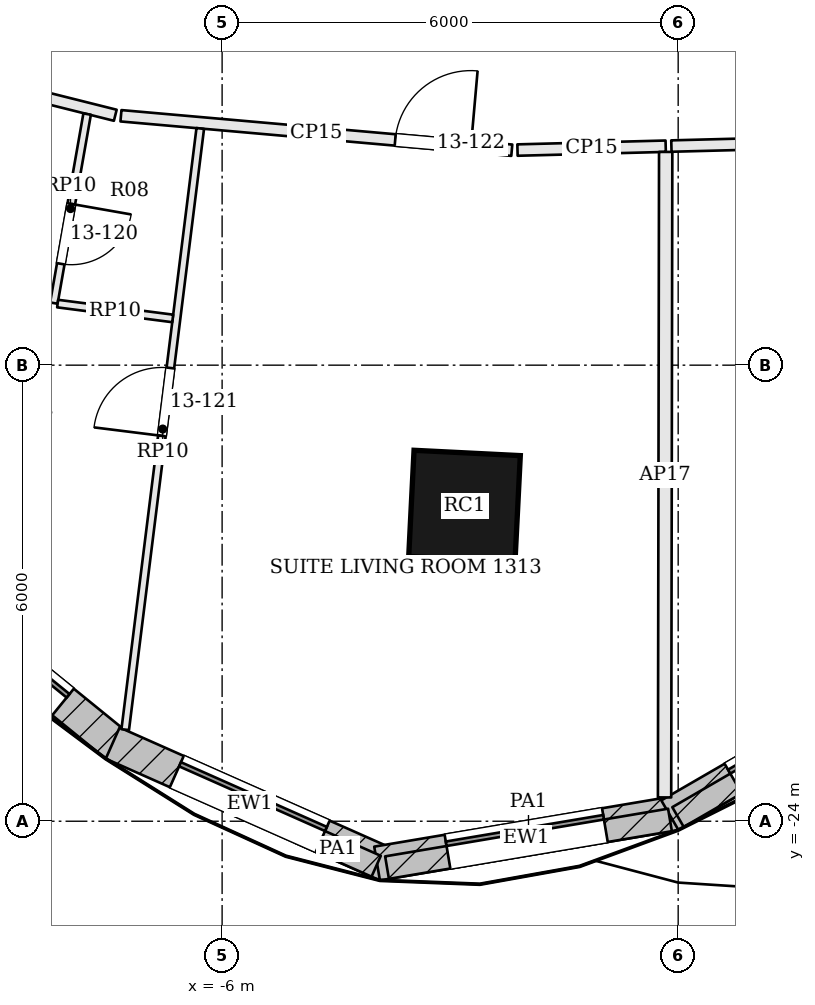
"""IFC4 building model, lengths in metres.
Left out: names, types, materials, properties, quantities, classifications, styles, units other than length and angle.
Written with IfcOpenShell. Run it as: python <this file> out.ifc"""

import sys

from ifc_helpers import new_model, si_unit, direction, frame, frame_2d, origin, origin_2d, place, context, subcontext, project, spatial, rectangle, extrude, element, fill, save


model = new_model("IFC4")
c1 = context("Model", 3, precision=1e-05, world=origin(), true_north=direction((0.0, 1.0)))
c2 = subcontext(c1, "Body", "Model", "MODEL_VIEW")
j1 = project(units=[si_unit("LENGTHUNIT", "METRE"), si_unit("PLANEANGLEUNIT", "RADIAN")], contexts=[c1])
p1 = place(None, origin())
s1 = spatial("IfcSite", under=j1, at=p1, CompositionType="ELEMENT")
p2 = place(p1, origin())
s2 = spatial("IfcBuilding", under=s1, at=p2, CompositionType="ELEMENT")
p3 = place(p2, frame((0.0, 0.0, 62.7)))
s3 = spatial("IfcBuildingStorey", under=s2, at=p3, CompositionType="ELEMENT", Elevation=62.7)
p4 = place(p3, frame((-2.811, -19.854, 0.0), z_axis=(0.0, 0.0, 1.0), x_axis=(0.99874501614, -0.050083857035, 0.0)))
e1 = element("IfcColumn", 1, at=p4, inside=s3, PredefinedType="COLUMN", context=c2, shape_type="SweptSolid", body=[
    extrude(rectangle(XDim=1.4, YDim=1.4, at=origin_2d()), origin(), (0.0, 0.0, 1.0), 3.6),
])
p5 = place(p3, frame((-10.422, -20.539, 0.0), z_axis=(0.0, 0.0, 1.0), x_axis=(0.775999170522, -0.63073392754, 0.0)))
e2 = element("IfcWall", 2, at=p5, inside=s3, PredefinedType="SOLIDWALL", context=c2, shape_type="SweptSolid", body=[
    extrude(rectangle(XDim=3.903, YDim=0.45, at=frame_2d((1.951, 0.0))), origin(), (0.0, 0.0, 1.0), 3.4),
])
p6 = place(p5, frame((0.901, 0.0, 0.9)))
e3 = element("IfcOpeningElement", 3, at=p6, cuts=e2, PredefinedType="OPENING", context=c2, shape_type="SweptSolid", body=[
    extrude(rectangle(XDim=2.1, YDim=2.0, at=frame_2d((1.05, 1.0))), frame((0.0, 0.235, 0.0), z_axis=(0.0, -1.0, 0.0), x_axis=(1.0, 0.0, 0.0)), (0.0, 0.0, 1.0), 0.47),
])
p7 = place(p3, frame((-7.44, -22.972, 0.0), z_axis=(0.0, 0.0, 1.0), x_axis=(0.914114918534, -0.405455195692, 0.0)))
e4 = element("IfcWall", 4, at=p7, inside=s3, PredefinedType="SOLIDWALL", context=c2, shape_type="SweptSolid", body=[
    extrude(rectangle(XDim=3.946, YDim=0.45, at=frame_2d((1.973, 0.0))), origin(), (0.0, 0.0, 1.0), 3.4),
])
p8 = place(p7, frame((0.923, 0.0, 0.9)))
e5 = element("IfcOpeningElement", 5, at=p8, cuts=e4, PredefinedType="OPENING", context=c2, shape_type="SweptSolid", body=[
    extrude(rectangle(XDim=2.1, YDim=2.0, at=frame_2d((1.05, 1.0))), frame((0.0, 0.235, 0.0), z_axis=(0.0, -1.0, 0.0), x_axis=(1.0, 0.0, 0.0)), (0.0, 0.0, 1.0), 0.47),
])
p9 = place(p3, frame((-3.961, -24.556, 0.0), z_axis=(0.0, 0.0, 1.0), x_axis=(0.986102211406, 0.166139786505, 0.0)))
e6 = element("IfcWall", 6, at=p9, inside=s3, PredefinedType="SOLIDWALL", context=c2, shape_type="SweptSolid", body=[
    extrude(rectangle(XDim=3.979, YDim=0.45, at=frame_2d((1.99, 0.0))), origin(), (0.0, 0.0, 1.0), 3.4),
])
p10 = place(p9, frame((0.94, 0.0, 0.9)))
e7 = element("IfcOpeningElement", 7, at=p10, cuts=e6, PredefinedType="OPENING", context=c2, shape_type="SweptSolid", body=[
    extrude(rectangle(XDim=2.1, YDim=2.0, at=frame_2d((1.05, 1.0))), frame((0.0, 0.235, 0.0), z_axis=(0.0, -1.0, 0.0), x_axis=(1.0, 0.0, 0.0)), (0.0, 0.0, 1.0), 0.47),
])
p11 = place(p3, frame((-0.109, -23.92, 0.0), z_axis=(0.0, 0.0, 1.0), x_axis=(0.865557769603, 0.500809092848, 0.0)))
e8 = element("IfcWall", 8, at=p11, inside=s3, PredefinedType="SOLIDWALL", context=c2, shape_type="SweptSolid", body=[
    extrude(rectangle(XDim=4.025, YDim=0.45, at=frame_2d((2.012, 0.0))), origin(), (0.0, 0.0, 1.0), 3.4),
])
p12 = place(p11, frame((0.962, 0.0, 0.9)))
e9 = element("IfcOpeningElement", 9, at=p12, cuts=e8, PredefinedType="OPENING", context=c2, shape_type="SweptSolid", body=[
    extrude(rectangle(XDim=2.1, YDim=2.0, at=frame_2d((1.05, 1.0))), frame((0.0, 0.235, 0.0), z_axis=(0.0, -1.0, 0.0), x_axis=(1.0, 0.0, 0.0)), (0.0, 0.0, 1.0), 0.47),
])
p13 = place(p3, frame((-4.979, -24.146, 3.6), z_axis=(0.0, 0.0, 1.0), x_axis=(0.91414047558, -0.405397571412, 0.0)))
e10 = element("IfcWall", 10, at=p13, inside=s3, PredefinedType="PARAPET", context=c2, shape_type="SweptSolid", body=[
    extrude(rectangle(XDim=1.101, YDim=0.3, at=frame_2d((0.55, 0.0))), origin(), (0.0, 0.0, 1.0), 1.1),
])
p14 = place(p3, frame((-3.83, -24.61, 3.6), z_axis=(0.0, 0.0, 1.0), x_axis=(0.986111051666, 0.166087307712, 0.0)))
e11 = element("IfcWall", 11, at=p14, inside=s3, PredefinedType="PARAPET", context=c2, shape_type="SweptSolid", body=[
    extrude(rectangle(XDim=3.775, YDim=0.3, at=frame_2d((1.887, 0.0))), origin(), (0.0, 0.0, 1.0), 1.1),
])
p15 = place(p3, frame((-0.002, -23.945, 3.6), z_axis=(0.0, 0.0, 1.0), x_axis=(0.865550152763, 0.500822256945, 0.0)))
e12 = element("IfcWall", 12, at=p15, inside=s3, PredefinedType="PARAPET", context=c2, shape_type="SweptSolid", body=[
    extrude(rectangle(XDim=3.913, YDim=0.3, at=frame_2d((1.956, 0.0))), origin(), (0.0, 0.0, 1.0), 1.1),
])
p16 = place(p3, frame((-12.083, -13.54, 0.0), z_axis=(0.0, 0.0, 1.0), x_axis=(0.969981460173, -0.243178878443, 0.0)))
e13 = element("IfcWall", 13, at=p16, inside=s3, PredefinedType="PARTITIONING", context=c2, shape_type="SweptSolid", body=[
    extrude(rectangle(XDim=4.822, YDim=0.15, at=frame_2d((2.411, 0.0))), origin(), (0.0, 0.0, 1.0), 2.68),
])
p17 = place(p3, frame((-7.331, -14.719, 0.0), z_axis=(0.0, 0.0, 1.0), x_axis=(0.996139466017, -0.087784760882, 0.0)))
e14 = element("IfcWall", 14, at=p17, inside=s3, PredefinedType="PARTITIONING", context=c2, shape_type="SweptSolid", body=[
    extrude(rectangle(XDim=5.162, YDim=0.15, at=frame_2d((2.581, 0.0))), origin(), (0.0, 0.0, 1.0), 2.68),
])
p18 = place(p17, frame((3.622, 0.0, 0.0)))
e15 = element("IfcOpeningElement", 15, at=p18, cuts=e14, PredefinedType="OPENING", context=c2, shape_type="SweptSolid", body=[
    extrude(rectangle(XDim=1.0, YDim=2.1, at=frame_2d((0.5, 1.05))), frame((0.0, 0.085, 0.0), z_axis=(0.0, -1.0, 0.0), x_axis=(1.0, 0.0, 0.0)), (0.0, 0.0, 1.0), 0.17),
])
p19 = place(p3, frame((-2.114, -15.17, 0.0), z_axis=(0.0, 0.0, 1.0), x_axis=(0.999660986361, 0.026036749958, 0.0)))
e16 = element("IfcWall", 16, at=p19, inside=s3, PredefinedType="PARTITIONING", context=c2, shape_type="SweptSolid", body=[
    extrude(rectangle(XDim=1.95, YDim=0.15, at=frame_2d((0.975, 0.0))), origin(), (0.0, 0.0, 1.0), 2.68),
])
p20 = place(p3, frame((-0.179, -23.687, 0.0), z_axis=(0.0, 0.0, 1.0), x_axis=(0.001753677156, 0.999998462307, 0.0)))
e17 = element("IfcWall", 17, at=p20, inside=s3, PredefinedType="PARTITIONING", context=c2, shape_type="SweptSolid", body=[
    extrude(rectangle(XDim=8.492, YDim=0.175, at=frame_2d((4.246, 0.0))), origin(), (0.0, 0.0, 1.0), 2.68),
])
p21 = place(p3, frame((-0.089, -15.117, 0.0), z_axis=(0.0, 0.0, 1.0), x_axis=(0.999662208654, 0.025989778545, 0.0)))
e18 = element("IfcWall", 18, at=p21, inside=s3, PredefinedType="PARTITIONING", context=c2, shape_type="SweptSolid", body=[
    extrude(rectangle(XDim=5.43, YDim=0.15, at=frame_2d((2.715, 0.0))), origin(), (0.0, 0.0, 1.0), 2.68),
])
p22 = place(p3, frame((-7.275, -22.795, 0.0), z_axis=(0.0, 0.0, 1.0), x_axis=(0.123872623133, 0.992298127197, 0.0)))
e19 = element("IfcWall", 19, at=p22, inside=s3, PredefinedType="PARTITIONING", context=c2, shape_type="SweptSolid", body=[
    extrude(rectangle(XDim=7.97, YDim=0.1, at=frame_2d((3.985, 0.0))), origin(), (0.0, 0.0, 1.0), 2.68),
])
p23 = place(p22, frame((3.895, 0.0, 0.0)))
e20 = element("IfcOpeningElement", 20, at=p23, cuts=e19, PredefinedType="OPENING", context=c2, shape_type="SweptSolid", body=[
    extrude(rectangle(XDim=0.9, YDim=2.4, at=frame_2d((0.45, 1.2))), frame((0.0, 0.06, 0.0), z_axis=(0.0, -1.0, 0.0), x_axis=(1.0, 0.0, 0.0)), (0.0, 0.0, 1.0), 0.12),
])
p24 = place(p3, frame((-7.776, -14.697, 0.0), z_axis=(0.0, 0.0, 1.0), x_axis=(-0.173360606745, -0.984858416235, 0.0)))
e21 = element("IfcWall", 21, at=p24, inside=s3, PredefinedType="PARTITIONING", context=c2, shape_type="SweptSolid", body=[
    extrude(rectangle(XDim=2.525, YDim=0.1, at=frame_2d((1.263, 0.0))), origin(), (0.0, 0.0, 1.0), 2.68),
])
p25 = place(p24, frame((1.2, 0.0, 0.0)))
e22 = element("IfcOpeningElement", 22, at=p25, cuts=e21, PredefinedType="OPENING", context=c2, shape_type="SweptSolid", body=[
    extrude(rectangle(XDim=0.8, YDim=2.1, at=frame_2d((0.4, 1.05))), frame((0.0, 0.06, 0.0), z_axis=(0.0, -1.0, 0.0), x_axis=(1.0, 0.0, 0.0)), (0.0, 0.0, 1.0), 0.12),
])
p26 = place(p3, frame((-8.164, -17.19, 0.0), z_axis=(0.0, 0.0, 1.0), x_axis=(0.991762801698, -0.128088036788, 0.0)))
e23 = element("IfcWall", 23, at=p26, inside=s3, PredefinedType="PARTITIONING", context=c2, shape_type="SweptSolid", body=[
    extrude(rectangle(XDim=1.527, YDim=0.1, at=frame_2d((0.763, 0.0))), origin(), (0.0, 0.0, 1.0), 2.68),
])
p27 = place(p6, origin())
e24 = element("IfcWindow", 24, at=p27, inside=s3, PartitioningType="SINGLE_PANEL", PredefinedType="WINDOW", context=c2, shape_type="SweptSolid", body=[
    extrude(rectangle(XDim=2.1, YDim=2.0, at=frame_2d((1.05, 1.0))), frame((0.0, 0.135, 0.0), z_axis=(0.0, -1.0, 0.0), x_axis=(1.0, 0.0, 0.0)), (0.0, 0.0, 1.0), 0.06),
])
fill(e3, e24)
p28 = place(p8, origin())
e25 = element("IfcWindow", 25, at=p28, inside=s3, PartitioningType="SINGLE_PANEL", PredefinedType="WINDOW", context=c2, shape_type="SweptSolid", body=[
    extrude(rectangle(XDim=2.1, YDim=2.0, at=frame_2d((1.05, 1.0))), frame((0.0, 0.135, 0.0), z_axis=(0.0, -1.0, 0.0), x_axis=(1.0, 0.0, 0.0)), (0.0, 0.0, 1.0), 0.06),
])
fill(e5, e25)
p29 = place(p10, origin())
e26 = element("IfcWindow", 26, at=p29, inside=s3, PartitioningType="SINGLE_PANEL", PredefinedType="WINDOW", context=c2, shape_type="SweptSolid", body=[
    extrude(rectangle(XDim=2.1, YDim=2.0, at=frame_2d((1.05, 1.0))), frame((0.0, 0.135, 0.0), z_axis=(0.0, -1.0, 0.0), x_axis=(1.0, 0.0, 0.0)), (0.0, 0.0, 1.0), 0.06),
])
fill(e7, e26)
p30 = place(p12, origin())
e27 = element("IfcWindow", 27, at=p30, inside=s3, PartitioningType="SINGLE_PANEL", PredefinedType="WINDOW", context=c2, shape_type="SweptSolid", body=[
    extrude(rectangle(XDim=2.1, YDim=2.0, at=frame_2d((1.05, 1.0))), frame((0.0, 0.135, 0.0), z_axis=(0.0, -1.0, 0.0), x_axis=(1.0, 0.0, 0.0)), (0.0, 0.0, 1.0), 0.06),
])
fill(e9, e27)
p31 = place(p25, origin())
e28 = element("IfcDoor", 28, at=p31, inside=s3, OperationType="SINGLE_SWING_LEFT", PredefinedType="DOOR", context=c2, shape_type="SweptSolid", body=[
    extrude(rectangle(XDim=0.8, YDim=2.1, at=frame_2d((0.4, 1.05))), frame((0.0, 0.025, 0.0), z_axis=(0.0, -1.0, 0.0), x_axis=(1.0, 0.0, 0.0)), (0.0, 0.0, 1.0), 0.05),
])
fill(e22, e28)
p32 = place(p23, origin())
e29 = element("IfcDoor", 29, at=p32, inside=s3, OperationType="SINGLE_SWING_LEFT", PredefinedType="DOOR", context=c2, shape_type="SweptSolid", body=[
    extrude(rectangle(XDim=0.9, YDim=2.4, at=frame_2d((0.45, 1.2))), frame((0.0, 0.025, 0.0), z_axis=(0.0, -1.0, 0.0), x_axis=(1.0, 0.0, 0.0)), (0.0, 0.0, 1.0), 0.05),
])
fill(e20, e29)
p33 = place(p18, origin())
e30 = element("IfcDoor", 30, at=p33, inside=s3, OperationType="SINGLE_SWING_RIGHT", PredefinedType="DOOR", context=c2, shape_type="SweptSolid", body=[
    extrude(rectangle(XDim=1.0, YDim=2.1, at=frame_2d((0.5, 1.05))), frame((0.0, 0.025, 0.0), z_axis=(0.0, -1.0, 0.0), x_axis=(1.0, 0.0, 0.0)), (0.0, 0.0, 1.0), 0.05),
])
fill(e15, e30)
save(model, sys.argv[1])
